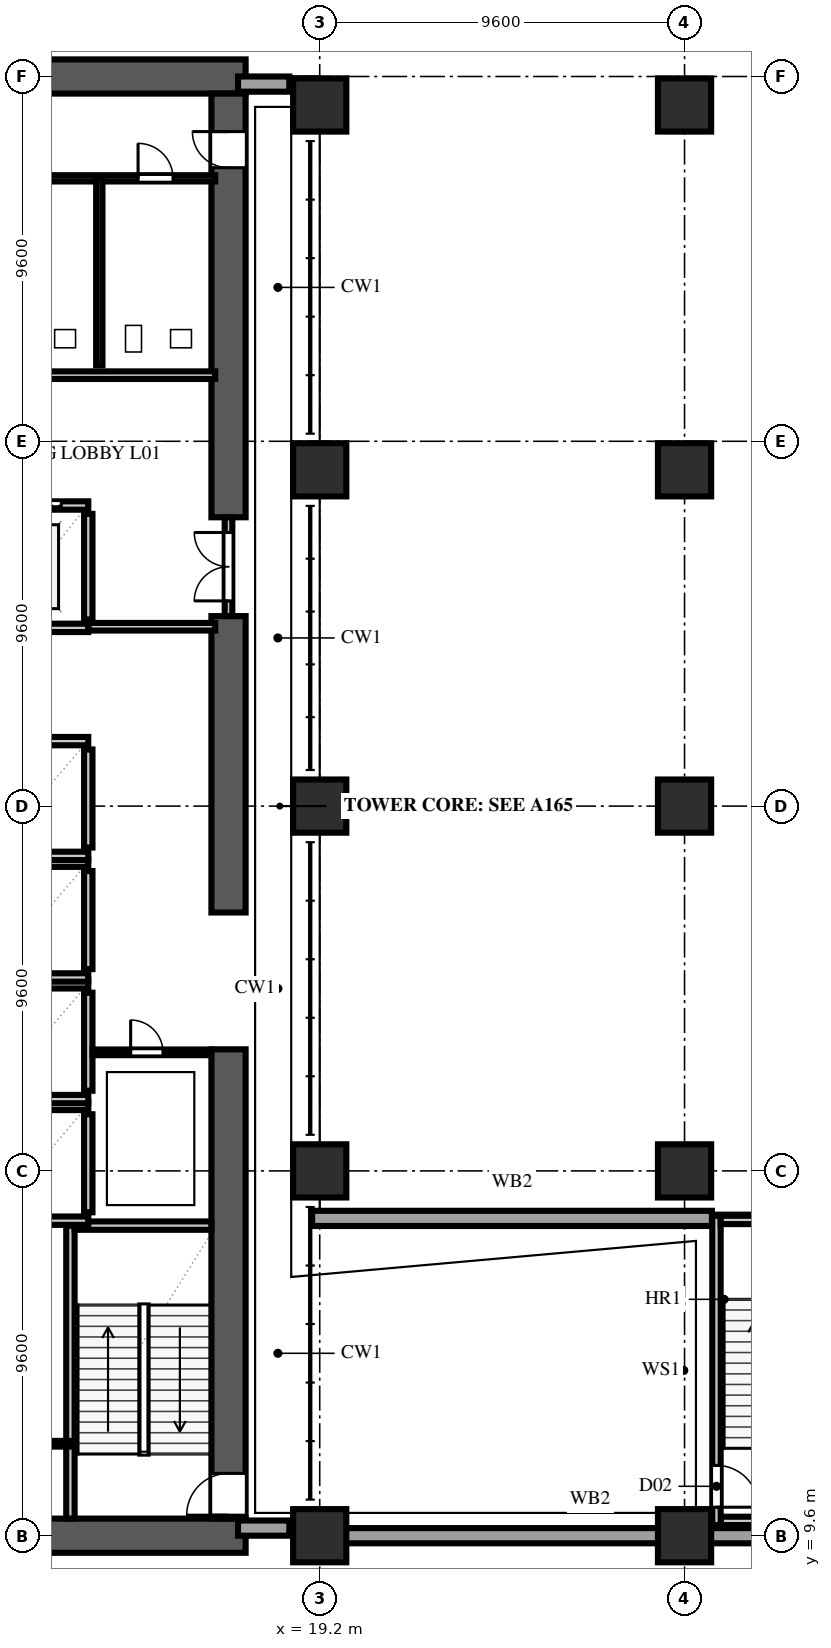
"""IFC4 building model, lengths in metres.
Left out: names, types, materials, properties, quantities, classifications, styles, units other than length and angle.
Written with IfcOpenShell. Run it as: python <this file> out.ifc"""

import sys

from ifc_helpers import new_model, si_unit, direction, frame, frame_2d, origin, origin_2d, place, context, subcontext, project, spatial, rectangle, extrude, element, fill, save


model = new_model("IFC4")
c1 = context("Model", 3, precision=1e-05, world=origin(), true_north=direction((0.0, 1.0)))
c2 = subcontext(c1, "Body", "Model", "MODEL_VIEW")
j1 = project(units=[si_unit("LENGTHUNIT", "METRE"), si_unit("PLANEANGLEUNIT", "RADIAN")], contexts=[c1])
p1 = place(None, origin())
s1 = spatial("IfcSite", under=j1, at=p1, CompositionType="ELEMENT")
p2 = place(p1, origin())
s2 = spatial("IfcBuilding", under=s1, at=p2, CompositionType="ELEMENT")
p3 = place(p2, frame((0.0, 0.0, 5.2)))
s3 = spatial("IfcBuildingStorey", under=s2, at=p3, CompositionType="ELEMENT", Elevation=5.2)
for number, where, z_axis, x_axis in (
    (1, (2.65, 9.6, 0.0), (0.0, 0.0, 1.0), (1.0, 0.0, 0.0)),
    (2, (2.65, 48.0, 0.0), (0.0, 0.0, 1.0), (1.0, 0.0, 0.0)),
):
    element("IfcWall", number, at=place(p3, frame(where, z_axis=z_axis, x_axis=x_axis)), inside=s3, PredefinedType="SHEAR", context=c2, shape_type="SweptSolid", body=[
        extrude(rectangle(XDim=14.6, YDim=0.9, at=frame_2d((7.3, 0.0))), origin(), (0.0, 0.0, 1.0), 4.86),
    ])
p4 = place(p3, frame((16.8, 10.05, 0.0), z_axis=(0.0, 0.0, 1.0), x_axis=(0.0, 1.0, 0.0)))
e3 = element("IfcWall", 3, at=p4, inside=s3, PredefinedType="SHEAR", context=c2, shape_type="SweptSolid", body=[
    extrude(rectangle(XDim=12.35, YDim=0.9, at=frame_2d((6.175, 0.0))), origin(), (0.0, 0.0, 1.0), 4.86),
])
p5 = place(p4, frame((0.09, 0.0, 0.0)))
e4 = element("IfcOpeningElement", 4, at=p5, cuts=e3, PredefinedType="OPENING", context=c2, shape_type="SweptSolid", body=[
    extrude(rectangle(XDim=1.1, YDim=2.2, at=frame_2d((0.55, 1.1))), frame((0.0, 0.462, 0.0), z_axis=(0.0, -1.0, 0.0), x_axis=(1.0, 0.0, 0.0)), (0.0, 0.0, 1.0), 0.924),
])
p6 = place(p3, frame((16.8, 26.0, 0.0), z_axis=(0.0, 0.0, 1.0), x_axis=(0.0, 1.0, 0.0)))
e5 = element("IfcWall", 5, at=p6, inside=s3, PredefinedType="SHEAR", context=c2, shape_type="SweptSolid", body=[
    extrude(rectangle(XDim=7.8, YDim=0.9, at=frame_2d((3.9, 0.0))), origin(), (0.0, 0.0, 1.0), 4.86),
])
p7 = place(p3, frame((16.8, 36.4, 0.0), z_axis=(0.0, 0.0, 1.0), x_axis=(0.0, 1.0, 0.0)))
e6 = element("IfcWall", 6, at=p7, inside=s3, PredefinedType="SHEAR", context=c2, shape_type="SweptSolid", body=[
    extrude(rectangle(XDim=11.15, YDim=0.9, at=frame_2d((5.575, 0.0))), origin(), (0.0, 0.0, 1.0), 4.86),
])
p8 = place(p7, frame((9.2, 0.0, 0.0)))
e7 = element("IfcOpeningElement", 7, at=p8, cuts=e6, PredefinedType="OPENING", context=c2, shape_type="SweptSolid", body=[
    extrude(rectangle(XDim=0.95, YDim=2.15, at=frame_2d((0.475, 1.075))), frame((0.0, 0.462, 0.0), z_axis=(0.0, -1.0, 0.0), x_axis=(1.0, 0.0, 0.0)), (0.0, 0.0, 1.0), 0.924),
])
for number, where, z_axis, x_axis in (
    (8, (19.2, 9.6, 0.0), (0.0, 0.0, 1.0), (1.0, 0.0, 0.0)),
    (9, (19.2, 19.2, 0.0), (0.0, 0.0, 1.0), (1.0, 0.0, 0.0)),
    (10, (19.2, 28.8, 0.0), (0.0, 0.0, 1.0), (1.0, 0.0, 0.0)),
    (11, (19.2, 37.65, 0.0), (0.0, 0.0, 1.0), (1.0, 0.0, 0.0)),
    (12, (19.2, 47.25, 0.0), (0.0, 0.0, 1.0), (1.0, 0.0, 0.0)),
    (13, (28.8, 9.6, 0.0), (0.0, 0.0, 1.0), (1.0, 0.0, 0.0)),
    (14, (28.8, 19.2, 0.0), (0.0, 0.0, 1.0), (1.0, 0.0, 0.0)),
    (15, (28.8, 28.8, 0.0), (0.0, 0.0, 1.0), (1.0, 0.0, 0.0)),
    (16, (28.8, 37.65, 0.0), (0.0, 0.0, 1.0), (1.0, 0.0, 0.0)),
    (17, (28.8, 47.25, 0.0), (0.0, 0.0, 1.0), (1.0, 0.0, 0.0)),
):
    element("IfcColumn", number, at=place(p3, frame(where, z_axis=z_axis, x_axis=x_axis)), inside=s3, PredefinedType="USERDEFINED", context=c2, shape_type="SweptSolid", body=[
        extrude(rectangle(XDim=1.4, YDim=1.4, at=origin_2d()), origin(), (0.0, 0.0, 1.0), 5.2),
    ])
p9 = place(p3, frame((17.05, 9.8, 0.0), z_axis=(0.0, 0.0, 1.0), x_axis=(1.0, 0.0, 0.0)))
e18 = element("IfcWall", 18, at=p9, inside=s3, PredefinedType="SOLIDWALL", context=c2, shape_type="SweptSolid", body=[
    extrude(rectangle(XDim=1.35, YDim=0.4, at=frame_2d((0.675, 0.0))), origin(), (0.0, 0.0, 1.0), 4.11),
])
p10 = place(p3, frame((17.05, 47.8, 0.0), z_axis=(0.0, 0.0, 1.0), x_axis=(1.0, 0.0, 0.0)))
e19 = element("IfcWall", 19, at=p10, inside=s3, PredefinedType="SOLIDWALL", context=c2, shape_type="SweptSolid", body=[
    extrude(rectangle(XDim=1.35, YDim=0.4, at=frame_2d((0.675, 0.0))), origin(), (0.0, 0.0, 1.0), 4.86),
])
p11 = place(p3, frame((19.0, 9.6, 0.0), z_axis=(0.0, 0.0, 1.0), x_axis=(1.0, 0.0, 0.0)))
e20 = element("IfcWall", 20, at=p11, inside=s3, PredefinedType="SOLIDWALL", context=c2, shape_type="SweptSolid", body=[
    extrude(rectangle(XDim=14.625, YDim=0.4, at=frame_2d((7.312, 0.0))), origin(), (0.0, 0.0, 1.0), 4.11),
])
p12 = place(p3, frame((19.0, 17.95, 0.0), z_axis=(0.0, 0.0, 1.0), x_axis=(1.0, 0.0, 0.0)))
e21 = element("IfcWall", 21, at=p12, inside=s3, PredefinedType="SOLIDWALL", context=c2, shape_type="SweptSolid", body=[
    extrude(rectangle(XDim=10.52, YDim=0.4, at=frame_2d((5.26, 0.0))), origin(), (0.0, 0.0, 1.0), 4.86),
])
p13 = place(p3, frame((12.64, 10.05, 0.0), z_axis=(0.0, 0.0, 1.0), x_axis=(0.0, 1.0, 0.0)))
e22 = element("IfcWall", 22, at=p13, inside=s3, PredefinedType="SOLIDWALL", context=c2, shape_type="SweptSolid", body=[
    extrude(rectangle(XDim=7.71, YDim=0.22, at=frame_2d((3.855, 0.0))), origin(), (0.0, 0.0, 1.0), 4.86),
])
p14 = place(p3, frame((12.75, 17.76, 0.0), z_axis=(0.0, 0.0, 1.0), x_axis=(1.0, 0.0, 0.0)))
e23 = element("IfcWall", 23, at=p14, inside=s3, PredefinedType="SOLIDWALL", context=c2, shape_type="SweptSolid", body=[
    extrude(rectangle(XDim=3.6, YDim=0.22, at=frame_2d((1.8, 0.0))), origin(), (0.0, 0.0, 1.0), 4.86),
])
p15 = place(p3, frame((29.75, 9.99, 0.0), z_axis=(0.0, 0.0, 1.0), x_axis=(1.0, 0.0, 0.0)))
e24 = element("IfcWall", 24, at=p15, inside=s3, PredefinedType="SOLIDWALL", context=c2, shape_type="SweptSolid", body=[
    extrude(rectangle(XDim=3.65, YDim=0.22, at=frame_2d((1.825, 0.0))), origin(), (0.0, 0.0, 1.0), 4.86),
])
p16 = place(p3, frame((29.64, 9.88, 0.0), z_axis=(0.0, 0.0, 1.0), x_axis=(0.0, 1.0, 0.0)))
e25 = element("IfcWall", 25, at=p16, inside=s3, PredefinedType="SOLIDWALL", context=c2, shape_type="SweptSolid", body=[
    extrude(rectangle(XDim=8.14, YDim=0.22, at=frame_2d((4.07, 0.0))), origin(), (0.0, 0.0, 1.0), 4.86),
])
p17 = place(p16, frame((0.47, 0.0, 0.0)))
e26 = element("IfcOpeningElement", 26, at=p17, cuts=e25, PredefinedType="OPENING", context=c2, shape_type="SweptSolid", body=[
    extrude(rectangle(XDim=1.1, YDim=2.2, at=frame_2d((0.55, 1.1))), frame((0.0, 0.122, 0.0), z_axis=(0.0, -1.0, 0.0), x_axis=(1.0, 0.0, 0.0)), (0.0, 0.0, 1.0), 0.244),
])
p18 = place(p3, frame((29.75, 17.91, 0.0), z_axis=(0.0, 0.0, 1.0), x_axis=(1.0, 0.0, 0.0)))
e27 = element("IfcWall", 27, at=p18, inside=s3, PredefinedType="SOLIDWALL", context=c2, shape_type="SweptSolid", body=[
    extrude(rectangle(XDim=3.65, YDim=0.22, at=frame_2d((1.825, 0.0))), origin(), (0.0, 0.0, 1.0), 4.86),
])
p19 = place(p3, frame((13.11, 18.11, 0.0), z_axis=(0.0, 0.0, 1.0), x_axis=(0.0, 1.0, 0.0)))
e28 = element("IfcWall", 28, at=p19, inside=s3, PredefinedType="SOLIDWALL", context=c2, shape_type="SweptSolid", body=[
    extrude(rectangle(XDim=2.58, YDim=0.22, at=frame_2d((1.29, 0.0))), origin(), (0.0, 0.0, 1.0), 4.86),
])
for number, where, z_axis, x_axis in (
    (29, (10.49, 17.89, 0.0), (0.0, 0.0, 1.0), (1.0, 0.0, 0.0)),
    (30, (10.49, 20.91, 0.0), (0.0, 0.0, 1.0), (1.0, 0.0, 0.0)),
):
    element("IfcWall", number, at=place(p3, frame(where, z_axis=z_axis, x_axis=x_axis)), inside=s3, PredefinedType="SOLIDWALL", context=c2, shape_type="SweptSolid", body=[
        extrude(rectangle(XDim=2.62, YDim=0.22, at=frame_2d((1.31, 0.0))), origin(), (0.0, 0.0, 1.0), 4.86),
    ])
p20 = place(p3, frame((13.11, 21.31, 0.0), z_axis=(0.0, 0.0, 1.0), x_axis=(0.0, 1.0, 0.0)))
e31 = element("IfcWall", 31, at=p20, inside=s3, PredefinedType="SOLIDWALL", context=c2, shape_type="SweptSolid", body=[
    extrude(rectangle(XDim=2.58, YDim=0.22, at=frame_2d((1.29, 0.0))), origin(), (0.0, 0.0, 1.0), 4.86),
])
for number, where, z_axis, x_axis in (
    (32, (10.49, 21.09, 0.0), (0.0, 0.0, 1.0), (1.0, 0.0, 0.0)),
    (33, (10.49, 24.11, 0.0), (0.0, 0.0, 1.0), (1.0, 0.0, 0.0)),
):
    element("IfcWall", number, at=place(p3, frame(where, z_axis=z_axis, x_axis=x_axis)), inside=s3, PredefinedType="SOLIDWALL", context=c2, shape_type="SweptSolid", body=[
        extrude(rectangle(XDim=2.62, YDim=0.22, at=frame_2d((1.31, 0.0))), origin(), (0.0, 0.0, 1.0), 4.86),
    ])
p21 = place(p3, frame((13.11, 24.51, 0.0), z_axis=(0.0, 0.0, 1.0), x_axis=(0.0, 1.0, 0.0)))
e34 = element("IfcWall", 34, at=p21, inside=s3, PredefinedType="SOLIDWALL", context=c2, shape_type="SweptSolid", body=[
    extrude(rectangle(XDim=2.58, YDim=0.22, at=frame_2d((1.29, 0.0))), origin(), (0.0, 0.0, 1.0), 4.86),
])
for number, where, z_axis, x_axis in (
    (35, (10.49, 24.29, 0.0), (0.0, 0.0, 1.0), (1.0, 0.0, 0.0)),
    (36, (10.49, 27.31, 0.0), (0.0, 0.0, 1.0), (1.0, 0.0, 0.0)),
):
    element("IfcWall", number, at=place(p3, frame(where, z_axis=z_axis, x_axis=x_axis)), inside=s3, PredefinedType="SOLIDWALL", context=c2, shape_type="SweptSolid", body=[
        extrude(rectangle(XDim=2.62, YDim=0.22, at=frame_2d((1.31, 0.0))), origin(), (0.0, 0.0, 1.0), 4.86),
    ])
p22 = place(p3, frame((13.11, 27.71, 0.0), z_axis=(0.0, 0.0, 1.0), x_axis=(0.0, 1.0, 0.0)))
e37 = element("IfcWall", 37, at=p22, inside=s3, PredefinedType="SOLIDWALL", context=c2, shape_type="SweptSolid", body=[
    extrude(rectangle(XDim=2.58, YDim=0.22, at=frame_2d((1.29, 0.0))), origin(), (0.0, 0.0, 1.0), 4.86),
])
for number, where, z_axis, x_axis in (
    (38, (10.49, 27.49, 0.0), (0.0, 0.0, 1.0), (1.0, 0.0, 0.0)),
    (39, (10.49, 30.51, 0.0), (0.0, 0.0, 1.0), (1.0, 0.0, 0.0)),
):
    element("IfcWall", number, at=place(p3, frame(where, z_axis=z_axis, x_axis=x_axis)), inside=s3, PredefinedType="SOLIDWALL", context=c2, shape_type="SweptSolid", body=[
        extrude(rectangle(XDim=2.62, YDim=0.22, at=frame_2d((1.31, 0.0))), origin(), (0.0, 0.0, 1.0), 4.86),
    ])
p23 = place(p3, frame((13.11, 33.71, 0.0), z_axis=(0.0, 0.0, 1.0), x_axis=(0.0, 1.0, 0.0)))
e40 = element("IfcWall", 40, at=p23, inside=s3, PredefinedType="SOLIDWALL", context=c2, shape_type="SweptSolid", body=[
    extrude(rectangle(XDim=2.78, YDim=0.22, at=frame_2d((1.39, 0.0))), origin(), (0.0, 0.0, 1.0), 4.86),
])
p24 = place(p3, frame((10.49, 33.49, 0.0), z_axis=(0.0, 0.0, 1.0), x_axis=(1.0, 0.0, 0.0)))
e41 = element("IfcWall", 41, at=p24, inside=s3, PredefinedType="SOLIDWALL", context=c2, shape_type="SweptSolid", body=[
    extrude(rectangle(XDim=2.62, YDim=0.22, at=frame_2d((1.31, 0.0))), origin(), (0.0, 0.0, 1.0), 4.86),
])
p25 = place(p3, frame((10.49, 36.71, 0.0), z_axis=(0.0, 0.0, 1.0), x_axis=(1.0, 0.0, 0.0)))
e42 = element("IfcWall", 42, at=p25, inside=s3, PredefinedType="SOLIDWALL", context=c2, shape_type="SweptSolid", body=[
    extrude(rectangle(XDim=2.62, YDim=0.22, at=frame_2d((1.31, 0.0))), origin(), (0.0, 0.0, 1.0), 4.86),
])
p26 = place(p25, frame((0.71, 0.0, 0.0)))
e43 = element("IfcOpeningElement", 43, at=p26, cuts=e42, PredefinedType="OPENING", context=c2, shape_type="SweptSolid", body=[
    extrude(rectangle(XDim=1.2, YDim=2.2, at=frame_2d((0.6, 1.1))), frame((0.0, 0.122, 0.0), z_axis=(0.0, -1.0, 0.0), x_axis=(1.0, 0.0, 0.0)), (0.0, 0.0, 1.0), 0.244),
])
p27 = place(p3, frame((13.12, 33.52, 0.0), z_axis=(0.0, 0.0, 1.0), x_axis=(1.0, 0.0, 0.0)))
e44 = element("IfcWall", 44, at=p27, inside=s3, PredefinedType="SOLIDWALL", context=c2, shape_type="SweptSolid", body=[
    extrude(rectangle(XDim=3.33, YDim=0.2, at=frame_2d((1.665, 0.0))), origin(), (0.0, 0.0, 1.0), 4.86),
])
p28 = place(p3, frame((6.32, 40.14, 0.0), z_axis=(0.0, 0.0, 1.0), x_axis=(1.0, 0.0, 0.0)))
e45 = element("IfcWall", 45, at=p28, inside=s3, PredefinedType="SOLIDWALL", context=c2, shape_type="SweptSolid", body=[
    extrude(rectangle(XDim=10.13, YDim=0.2, at=frame_2d((5.065, 0.0))), origin(), (0.0, 0.0, 1.0), 4.86),
])
p29 = place(p3, frame((16.8, 33.8, 0.0), z_axis=(0.0, 0.0, 1.0), x_axis=(0.0, 1.0, 0.0)))
e46 = element("IfcWall", 46, at=p29, inside=s3, PredefinedType="SOLIDWALL", context=c2, shape_type="SweptSolid", body=[
    extrude(rectangle(XDim=2.6, YDim=0.2, at=frame_2d((1.3, 0.0))), origin(), (0.0, 0.0, 1.0), 4.86),
])
p30 = place(p29, frame((0.4, 0.0, 0.0)))
e47 = element("IfcOpeningElement", 47, at=p30, cuts=e46, PredefinedType="OPENING", context=c2, shape_type="SweptSolid", body=[
    extrude(rectangle(XDim=1.8, YDim=2.2, at=frame_2d((0.9, 1.1))), frame((0.0, 0.112, 0.0), z_axis=(0.0, -1.0, 0.0), x_axis=(1.0, 0.0, 0.0)), (0.0, 0.0, 1.0), 0.224),
])
p31 = place(p3, frame((10.55, 12.02, 0.0), z_axis=(0.0, 0.0, 1.0), x_axis=(1.0, 0.0, 0.0)))
e48 = element("IfcWall", 48, at=p31, inside=s3, PredefinedType="PARTITIONING", context=c2, shape_type="SweptSolid", body=[
    extrude(rectangle(XDim=2.08, YDim=0.15, at=frame_2d((1.04, 0.0))), origin(), (0.0, 0.0, 1.0), 4.86),
])
p32 = place(p31, frame((0.5, 0.0, 0.0)))
e49 = element("IfcOpeningElement", 49, at=p32, cuts=e48, PredefinedType="OPENING", context=c2, shape_type="SweptSolid", body=[
    extrude(rectangle(XDim=0.85, YDim=2.1, at=frame_2d((0.425, 1.05))), frame((0.0, 0.087, 0.0), z_axis=(0.0, -1.0, 0.0), x_axis=(1.0, 0.0, 0.0)), (0.0, 0.0, 1.0), 0.174),
])
p33 = place(p3, frame((13.225, 22.32, 0.0), z_axis=(0.0, 0.0, 1.0), x_axis=(1.0, 0.0, 0.0)))
e50 = element("IfcWall", 50, at=p33, inside=s3, PredefinedType="PARTITIONING", context=c2, shape_type="SweptSolid", body=[
    extrude(rectangle(XDim=3.12, YDim=0.15, at=frame_2d((1.56, 0.0))), origin(), (0.0, 0.0, 1.0), 4.86),
])
p34 = place(p33, frame((1.0, 0.0, 0.0)))
e51 = element("IfcOpeningElement", 51, at=p34, cuts=e50, PredefinedType="OPENING", context=c2, shape_type="SweptSolid", body=[
    extrude(rectangle(XDim=0.85, YDim=2.1, at=frame_2d((0.425, 1.05))), frame((0.0, 0.087, 0.0), z_axis=(0.0, -1.0, 0.0), x_axis=(1.0, 0.0, 0.0)), (0.0, 0.0, 1.0), 0.174),
])
p35 = place(p3, frame((6.32, 45.32, 0.0), z_axis=(0.0, 0.0, 1.0), x_axis=(1.0, 0.0, 0.0)))
e52 = element("IfcWall", 52, at=p35, inside=s3, PredefinedType="PLUMBINGWALL", context=c2, shape_type="SweptSolid", body=[
    extrude(rectangle(XDim=10.13, YDim=0.165, at=frame_2d((5.065, 0.0))), origin(), (0.0, 0.0, 1.0), 4.86),
])
p36 = place(p35, frame((0.9, 0.0, 0.0)))
e53 = element("IfcOpeningElement", 53, at=p36, cuts=e52, PredefinedType="OPENING", context=c2, shape_type="SweptSolid", body=[
    extrude(rectangle(XDim=0.92, YDim=2.15, at=frame_2d((0.46, 1.075))), frame((0.0, 0.094, 0.0), z_axis=(0.0, -1.0, 0.0), x_axis=(1.0, 0.0, 0.0)), (0.0, 0.0, 1.0), 0.189),
])
p37 = place(p35, frame((4.6, 0.0, 0.0)))
e54 = element("IfcOpeningElement", 54, at=p37, cuts=e52, PredefinedType="OPENING", context=c2, shape_type="SweptSolid", body=[
    extrude(rectangle(XDim=0.92, YDim=2.15, at=frame_2d((0.46, 1.075))), frame((0.0, 0.094, 0.0), z_axis=(0.0, -1.0, 0.0), x_axis=(1.0, 0.0, 0.0)), (0.0, 0.0, 1.0), 0.189),
])
p38 = place(p35, frame((8.1, 0.0, 0.0)))
e55 = element("IfcOpeningElement", 55, at=p38, cuts=e52, PredefinedType="OPENING", context=c2, shape_type="SweptSolid", body=[
    extrude(rectangle(XDim=0.92, YDim=2.15, at=frame_2d((0.46, 1.075))), frame((0.0, 0.094, 0.0), z_axis=(0.0, -1.0, 0.0), x_axis=(1.0, 0.0, 0.0)), (0.0, 0.0, 1.0), 0.189),
])
p39 = place(p3, frame((13.4, 40.4, 0.0), z_axis=(0.0, 0.0, 1.0), x_axis=(0.0, 1.0, 0.0)))
e56 = element("IfcWall", 56, at=p39, inside=s3, PredefinedType="PLUMBINGWALL", context=c2, shape_type="SweptSolid", body=[
    extrude(rectangle(XDim=4.92, YDim=0.165, at=frame_2d((2.46, 0.0))), origin(), (0.0, 0.0, 1.0), 4.86),
])
p40 = place(p5, origin())
e57 = element("IfcDoor", 57, at=p40, inside=s3, OperationType="SINGLE_SWING_LEFT", PredefinedType="DOOR", context=c2, shape_type="SweptSolid", body=[
    extrude(rectangle(XDim=1.1, YDim=2.2, at=frame_2d((0.55, 1.1))), frame((0.0, 0.025, 0.0), z_axis=(0.0, -1.0, 0.0), x_axis=(1.0, 0.0, 0.0)), (0.0, 0.0, 1.0), 0.05),
])
fill(e4, e57)
p41 = place(p17, frame((1.1, 0.0, 0.0), z_axis=(0.0, 0.0, 1.0), x_axis=(-1.0, 0.0, 0.0)))
e58 = element("IfcDoor", 58, at=p41, inside=s3, OperationType="SINGLE_SWING_RIGHT", PredefinedType="DOOR", context=c2, shape_type="SweptSolid", body=[
    extrude(rectangle(XDim=1.1, YDim=2.2, at=frame_2d((0.55, 1.1))), frame((0.0, 0.025, 0.0), z_axis=(0.0, -1.0, 0.0), x_axis=(1.0, 0.0, 0.0)), (0.0, 0.0, 1.0), 0.05),
])
fill(e26, e58)
p42 = place(p26, origin())
e59 = element("IfcDoor", 59, at=p42, inside=s3, OperationType="DOUBLE_DOOR_SLIDING", PredefinedType="DOOR", context=c2, shape_type="SweptSolid", body=[
    extrude(rectangle(XDim=1.2, YDim=2.2, at=frame_2d((0.6, 1.1))), frame((0.0, 0.025, 0.0), z_axis=(0.0, -1.0, 0.0), x_axis=(1.0, 0.0, 0.0)), (0.0, 0.0, 1.0), 0.05),
])
fill(e43, e59)
p43 = place(p8, origin())
e60 = element("IfcDoor", 60, at=p43, inside=s3, OperationType="SINGLE_SWING_RIGHT", PredefinedType="DOOR", context=c2, shape_type="SweptSolid", body=[
    extrude(rectangle(XDim=0.95, YDim=2.15, at=frame_2d((0.475, 1.075))), frame((0.0, 0.025, 0.0), z_axis=(0.0, -1.0, 0.0), x_axis=(1.0, 0.0, 0.0)), (0.0, 0.0, 1.0), 0.05),
])
fill(e7, e60)
p44 = place(p30, origin())
e61 = element("IfcDoor", 61, at=p44, inside=s3, OperationType="DOUBLE_DOOR_SINGLE_SWING", PredefinedType="DOOR", context=c2, shape_type="SweptSolid", body=[
    extrude(rectangle(XDim=1.8, YDim=2.2, at=frame_2d((0.9, 1.1))), frame((0.0, 0.025, 0.0), z_axis=(0.0, -1.0, 0.0), x_axis=(1.0, 0.0, 0.0)), (0.0, 0.0, 1.0), 0.05),
])
fill(e47, e61)
p45 = place(p34, origin())
e62 = element("IfcDoor", 62, at=p45, inside=s3, OperationType="SINGLE_SWING_LEFT", PredefinedType="DOOR", context=c2, shape_type="SweptSolid", body=[
    extrude(rectangle(XDim=0.85, YDim=2.1, at=frame_2d((0.425, 1.05))), frame((0.0, 0.025, 0.0), z_axis=(0.0, -1.0, 0.0), x_axis=(1.0, 0.0, 0.0)), (0.0, 0.0, 1.0), 0.05),
])
fill(e51, e62)
p46 = place(p38, origin())
e63 = element("IfcDoor", 63, at=p46, inside=s3, OperationType="SINGLE_SWING_LEFT", PredefinedType="DOOR", context=c2, shape_type="SweptSolid", body=[
    extrude(rectangle(XDim=0.92, YDim=2.15, at=frame_2d((0.46, 1.075))), frame((0.0, 0.025, 0.0), z_axis=(0.0, -1.0, 0.0), x_axis=(1.0, 0.0, 0.0)), (0.0, 0.0, 1.0), 0.05),
])
fill(e55, e63)
save(model, sys.argv[1])
